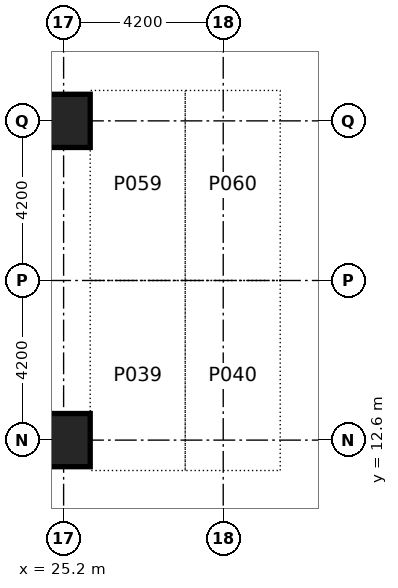
"""IFC4 building model, lengths in metres.
Left out: names, types, materials, properties, quantities, classifications, styles, units other than length and angle.
Written with IfcOpenShell. Run it as: python <this file> out.ifc"""

import sys

from ifc_helpers import new_model, si_unit, direction, frame, origin, origin_2d, place, context, subcontext, project, spatial, rectangle, extrude, element, save


model = new_model("IFC4")
c1 = context("Model", 3, precision=1e-05, world=origin(), true_north=direction((0.0, 1.0)))
c2 = subcontext(c1, "Body", "Model", "MODEL_VIEW")
j1 = project(units=[si_unit("LENGTHUNIT", "METRE"), si_unit("PLANEANGLEUNIT", "RADIAN")], contexts=[c1])
p1 = place(None, origin())
s1 = spatial("IfcSite", under=j1, at=p1, CompositionType="ELEMENT")
p2 = place(p1, origin())
s2 = spatial("IfcBuilding", under=s1, at=p2, CompositionType="ELEMENT")
p3 = place(p2, frame((0.0, 0.0, -4.2)))
s3 = spatial("IfcBuildingStorey", under=s2, at=p3, CompositionType="ELEMENT", Elevation=-4.2)
p4 = place(p3, frame((25.2, 12.6, -0.35), z_axis=(0.0, 0.0, 1.0), x_axis=(1.0, 0.0, 0.0)))
e1 = element("IfcColumn", 1, at=p4, inside=s3, PredefinedType="COLUMN", context=c2, shape_type="SweptSolid", body=[
    extrude(rectangle(XDim=1.4, YDim=1.4, at=origin_2d()), origin(), (0.0, 0.0, 1.0), 4.1),
])
p5 = place(p3, frame((25.2, 21.0, 0.0), z_axis=(0.0, 0.0, 1.0), x_axis=(1.0, 0.0, 0.0)))
e2 = element("IfcColumn", 2, at=p5, inside=s3, PredefinedType="COLUMN", context=c2, shape_type="SweptSolid", body=[
    extrude(rectangle(XDim=1.4, YDim=1.4, at=origin_2d()), origin(), (0.0, 0.0, 1.0), 4.2),
])
save(model, sys.argv[1])
